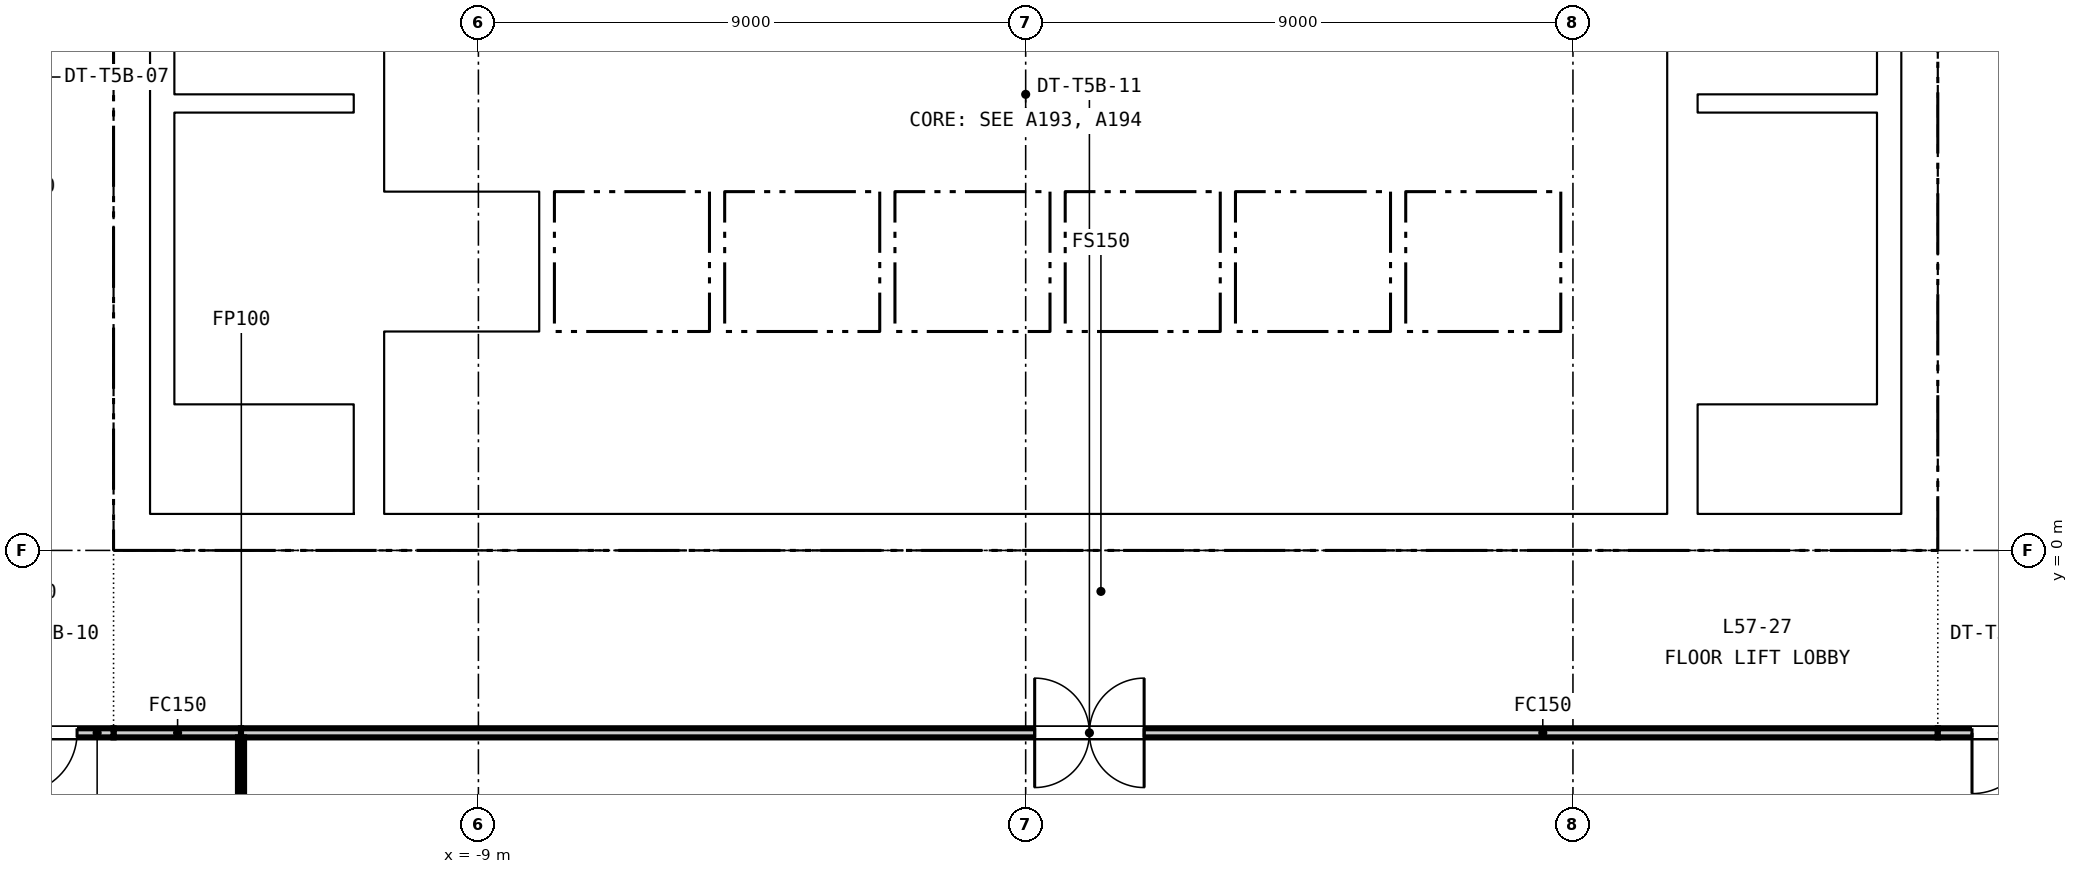
"""IFC4 building model, lengths in metres.
Left out: names, types, materials, properties, quantities, classifications, styles, units other than length and angle.
Written with IfcOpenShell. Run it as: python <this file> out.ifc"""

import sys

from ifc_helpers import new_model, si_unit, direction, frame, frame_2d, origin, place, context, subcontext, project, spatial, rectangle, extrude, element, fill, save


model = new_model("IFC4")
c1 = context("Model", 3, precision=1e-05, world=origin(), true_north=direction((0.0, 1.0)))
c2 = subcontext(c1, "Body", "Model", "MODEL_VIEW")
j1 = project(units=[si_unit("LENGTHUNIT", "METRE"), si_unit("PLANEANGLEUNIT", "RADIAN")], contexts=[c1])
p1 = place(None, origin())
s1 = spatial("IfcSite", under=j1, at=p1, CompositionType="ELEMENT")
p2 = place(p1, origin())
s2 = spatial("IfcBuilding", under=s1, at=p2, CompositionType="ELEMENT")
p3 = place(p2, frame((0.0, 0.0, 227.25)))
s3 = spatial("IfcBuildingStorey", under=s2, at=p3, CompositionType="ELEMENT", Elevation=227.25)
p4 = place(p3, frame((-15.0, 0.3, -0.15), z_axis=(0.0, 0.0, 1.0), x_axis=(1.0, 0.0, 0.0)))
e1 = element("IfcWall", 1, at=p4, inside=s3, PredefinedType="SOLIDWALL", context=c2, shape_type="SweptSolid", body=[
    extrude(rectangle(XDim=30.0, YDim=0.6, at=frame_2d((15.0, 0.0))), origin(), (0.0, 0.0, 1.0), 3.65),
])
p5 = place(p4, frame((5.8, 0.0, 0.15)))
e2 = element("IfcOpeningElement", 2, at=p5, cuts=e1, PredefinedType="OPENING", context=c2, shape_type="SweptSolid", body=[
    extrude(rectangle(XDim=2.4, YDim=2.4, at=frame_2d((1.2, 1.2))), frame((0.0, 0.31, 0.0), z_axis=(0.0, -1.0, 0.0), x_axis=(1.0, 0.0, 0.0)), (0.0, 0.0, 1.0), 0.62),
])
p6 = place(p4, frame((13.8, 0.0, 0.15)))
e3 = element("IfcOpeningElement", 3, at=p6, cuts=e1, PredefinedType="OPENING", context=c2, shape_type="SweptSolid", body=[
    extrude(rectangle(XDim=2.4, YDim=2.4, at=frame_2d((1.2, 1.2))), frame((0.0, 0.31, 0.0), z_axis=(0.0, -1.0, 0.0), x_axis=(1.0, 0.0, 0.0)), (0.0, 0.0, 1.0), 0.62),
])
p7 = place(p4, frame((21.8, 0.0, 0.15)))
e4 = element("IfcOpeningElement", 4, at=p7, cuts=e1, PredefinedType="OPENING", context=c2, shape_type="SweptSolid", body=[
    extrude(rectangle(XDim=2.4, YDim=2.4, at=frame_2d((1.2, 1.2))), frame((0.0, 0.31, 0.0), z_axis=(0.0, -1.0, 0.0), x_axis=(1.0, 0.0, 0.0)), (0.0, 0.0, 1.0), 0.62),
])
p8 = place(p4, frame((1.5, 0.0, 0.15)))
e5 = element("IfcOpeningElement", 5, at=p8, cuts=e1, PredefinedType="OPENING", context=c2, shape_type="SweptSolid", body=[
    extrude(rectangle(XDim=1.2, YDim=2.1, at=frame_2d((0.6, 1.05))), frame((0.0, 0.31, 0.0), z_axis=(0.0, -1.0, 0.0), x_axis=(1.0, 0.0, 0.0)), (0.0, 0.0, 1.0), 0.62),
])
p9 = place(p4, frame((27.3, 0.0, 0.15)))
e6 = element("IfcOpeningElement", 6, at=p9, cuts=e1, PredefinedType="OPENING", context=c2, shape_type="SweptSolid", body=[
    extrude(rectangle(XDim=1.2, YDim=2.1, at=frame_2d((0.6, 1.05))), frame((0.0, 0.31, 0.0), z_axis=(0.0, -1.0, 0.0), x_axis=(1.0, 0.0, 0.0)), (0.0, 0.0, 1.0), 0.62),
])
for number, where, z_axis, x_axis in (
    (7, (-14.7, 0.6, -0.15), (0.0, 0.0, 1.0), (0.0, 1.0, 0.0)),
    (8, (14.7, 0.6, -0.15), (0.0, 0.0, 1.0), (0.0, 1.0, 0.0)),
):
    element("IfcWall", number, at=place(p3, frame(where, z_axis=z_axis, x_axis=x_axis)), inside=s3, PredefinedType="SOLIDWALL", context=c2, shape_type="SweptSolid", body=[
        extrude(rectangle(XDim=13.8, YDim=0.6, at=frame_2d((6.9, 0.0))), origin(), (0.0, 0.0, 1.0), 3.65),
    ])
for number, where, z_axis, x_axis in (
    (9, (-10.8, 0.6, -0.15), (0.0, 0.0, 1.0), (0.0, 1.0, 0.0)),
    (10, (10.8, 0.6, -0.15), (0.0, 0.0, 1.0), (0.0, 1.0, 0.0)),
):
    element("IfcWall", number, at=place(p3, frame(where, z_axis=z_axis, x_axis=x_axis)), inside=s3, PredefinedType="SOLIDWALL", context=c2, shape_type="SweptSolid", body=[
        extrude(rectangle(XDim=13.8, YDim=0.5, at=frame_2d((6.9, 0.0))), origin(), (0.0, 0.0, 1.0), 3.65),
    ])
p10 = place(p3, frame((-10.55, 3.5, 0.0), z_axis=(0.0, 0.0, 1.0), x_axis=(1.0, 0.0, 0.0)))
e11 = element("IfcWall", 11, at=p10, inside=s3, PredefinedType="PARTITIONING", context=c2, shape_type="SweptSolid", body=[
    extrude(rectangle(XDim=21.1, YDim=0.2, at=frame_2d((10.55, 0.0))), origin(), (0.0, 0.0, 1.0), 3.5),
])
p11 = place(p10, frame((0.675, 0.0, 0.0)))
e12 = element("IfcOpeningElement", 12, at=p11, cuts=e11, PredefinedType="OPENING", context=c2, shape_type="SweptSolid", body=[
    extrude(rectangle(XDim=1.2, YDim=2.1, at=frame_2d((0.6, 1.05))), frame((0.0, 0.11, 0.0), z_axis=(0.0, -1.0, 0.0), x_axis=(1.0, 0.0, 0.0)), (0.0, 0.0, 1.0), 0.22),
])
p12 = place(p10, frame((3.475, 0.0, 0.0)))
e13 = element("IfcOpeningElement", 13, at=p12, cuts=e11, PredefinedType="OPENING", context=c2, shape_type="SweptSolid", body=[
    extrude(rectangle(XDim=1.2, YDim=2.1, at=frame_2d((0.6, 1.05))), frame((0.0, 0.11, 0.0), z_axis=(0.0, -1.0, 0.0), x_axis=(1.0, 0.0, 0.0)), (0.0, 0.0, 1.0), 0.22),
])
p13 = place(p10, frame((6.275, 0.0, 0.0)))
e14 = element("IfcOpeningElement", 14, at=p13, cuts=e11, PredefinedType="OPENING", context=c2, shape_type="SweptSolid", body=[
    extrude(rectangle(XDim=1.2, YDim=2.1, at=frame_2d((0.6, 1.05))), frame((0.0, 0.11, 0.0), z_axis=(0.0, -1.0, 0.0), x_axis=(1.0, 0.0, 0.0)), (0.0, 0.0, 1.0), 0.22),
])
p14 = place(p10, frame((9.075, 0.0, 0.0)))
e15 = element("IfcOpeningElement", 15, at=p14, cuts=e11, PredefinedType="OPENING", context=c2, shape_type="SweptSolid", body=[
    extrude(rectangle(XDim=1.2, YDim=2.1, at=frame_2d((0.6, 1.05))), frame((0.0, 0.11, 0.0), z_axis=(0.0, -1.0, 0.0), x_axis=(1.0, 0.0, 0.0)), (0.0, 0.0, 1.0), 0.22),
])
p15 = place(p10, frame((11.875, 0.0, 0.0)))
e16 = element("IfcOpeningElement", 16, at=p15, cuts=e11, PredefinedType="OPENING", context=c2, shape_type="SweptSolid", body=[
    extrude(rectangle(XDim=1.2, YDim=2.1, at=frame_2d((0.6, 1.05))), frame((0.0, 0.11, 0.0), z_axis=(0.0, -1.0, 0.0), x_axis=(1.0, 0.0, 0.0)), (0.0, 0.0, 1.0), 0.22),
])
p16 = place(p10, frame((14.675, 0.0, 0.0)))
e17 = element("IfcOpeningElement", 17, at=p16, cuts=e11, PredefinedType="OPENING", context=c2, shape_type="SweptSolid", body=[
    extrude(rectangle(XDim=1.2, YDim=2.1, at=frame_2d((0.6, 1.05))), frame((0.0, 0.11, 0.0), z_axis=(0.0, -1.0, 0.0), x_axis=(1.0, 0.0, 0.0)), (0.0, 0.0, 1.0), 0.22),
])
p17 = place(p10, frame((17.475, 0.0, 0.0)))
e18 = element("IfcOpeningElement", 18, at=p17, cuts=e11, PredefinedType="OPENING", context=c2, shape_type="SweptSolid", body=[
    extrude(rectangle(XDim=1.2, YDim=2.1, at=frame_2d((0.6, 1.05))), frame((0.0, 0.11, 0.0), z_axis=(0.0, -1.0, 0.0), x_axis=(1.0, 0.0, 0.0)), (0.0, 0.0, 1.0), 0.22),
])
p18 = place(p10, frame((19.9, 0.0, 0.0)))
e19 = element("IfcOpeningElement", 19, at=p18, cuts=e11, PredefinedType="OPENING", context=c2, shape_type="SweptSolid", body=[
    extrude(rectangle(XDim=0.9, YDim=2.1, at=frame_2d((0.45, 1.05))), frame((0.0, 0.11, 0.0), z_axis=(0.0, -1.0, 0.0), x_axis=(1.0, 0.0, 0.0)), (0.0, 0.0, 1.0), 0.22),
])
p19 = place(p3, frame((-10.55, 6.025, 0.0), z_axis=(0.0, 0.0, 1.0), x_axis=(1.0, 0.0, 0.0)))
e20 = element("IfcWall", 20, at=p19, inside=s3, PredefinedType="PARTITIONING", context=c2, shape_type="SweptSolid", body=[
    extrude(rectangle(XDim=21.1, YDim=0.25, at=frame_2d((10.55, 0.0))), origin(), (0.0, 0.0, 1.0), 3.5),
])
p20 = place(p3, frame((-4.125, 6.15, 0.0), z_axis=(0.0, 0.0, 1.0), x_axis=(0.0, 1.0, 0.0)))
e21 = element("IfcWall", 21, at=p20, inside=s3, PredefinedType="PARTITIONING", context=c2, shape_type="SweptSolid", body=[
    extrude(rectangle(XDim=4.95, YDim=0.25, at=frame_2d((2.475, 0.0))), origin(), (0.0, 0.0, 1.0), 3.5),
])
p21 = place(p20, frame((3.125, 0.0, 0.0)))
e22 = element("IfcOpeningElement", 22, at=p21, cuts=e21, PredefinedType="OPENING", context=c2, shape_type="SweptSolid", body=[
    extrude(rectangle(XDim=1.2, YDim=2.1, at=frame_2d((0.6, 1.05))), frame((0.0, 0.135, 0.0), z_axis=(0.0, -1.0, 0.0), x_axis=(1.0, 0.0, 0.0)), (0.0, 0.0, 1.0), 0.27),
])
for number, where, z_axis, x_axis in (
    (23, (-7.875, 3.6, 0.0), (0.0, 0.0, 1.0), (0.0, 1.0, 0.0)),
    (24, (-5.075, 3.6, 0.0), (0.0, 0.0, 1.0), (0.0, 1.0, 0.0)),
    (25, (-2.275, 3.6, 0.0), (0.0, 0.0, 1.0), (0.0, 1.0, 0.0)),
    (26, (0.525, 3.6, 0.0), (0.0, 0.0, 1.0), (0.0, 1.0, 0.0)),
    (27, (3.325, 3.6, 0.0), (0.0, 0.0, 1.0), (0.0, 1.0, 0.0)),
    (28, (6.125, 3.6, 0.0), (0.0, 0.0, 1.0), (0.0, 1.0, 0.0)),
    (29, (8.925, 3.6, 0.0), (0.0, 0.0, 1.0), (0.0, 1.0, 0.0)),
):
    element("IfcWall", number, at=place(p3, frame(where, z_axis=z_axis, x_axis=x_axis)), inside=s3, PredefinedType="PARTITIONING", context=c2, shape_type="SweptSolid", body=[
        extrude(rectangle(XDim=2.3, YDim=0.25, at=frame_2d((1.15, 0.0))), origin(), (0.0, 0.0, 1.0), 3.5),
    ])
for number, where, z_axis, x_axis in (
    (30, (1.7, 6.15, 0.0), (0.0, 0.0, 1.0), (0.0, 1.0, 0.0)),
    (31, (4.6, 6.15, 0.0), (0.0, 0.0, 1.0), (0.0, 1.0, 0.0)),
):
    element("IfcWall", number, at=place(p3, frame(where, z_axis=z_axis, x_axis=x_axis)), inside=s3, PredefinedType="PARTITIONING", context=c2, shape_type="SweptSolid", body=[
        extrude(rectangle(XDim=2.3, YDim=0.15, at=frame_2d((1.15, 0.0))), origin(), (0.0, 0.0, 1.0), 3.5),
    ])
p22 = place(p3, frame((8.925, 6.15, 0.0), z_axis=(0.0, 0.0, 1.0), x_axis=(0.0, 1.0, 0.0)))
e32 = element("IfcWall", 32, at=p22, inside=s3, PredefinedType="PARTITIONING", context=c2, shape_type="SweptSolid", body=[
    extrude(rectangle(XDim=2.3, YDim=0.25, at=frame_2d((1.15, 0.0))), origin(), (0.0, 0.0, 1.0), 3.5),
])
p23 = place(p3, frame((-14.0, 7.35, 0.0), z_axis=(0.0, 0.0, 1.0), x_axis=(1.0, 0.0, 0.0)))
e33 = element("IfcWall", 33, at=p23, inside=s3, PredefinedType="SOLIDWALL", context=c2, shape_type="SweptSolid", body=[
    extrude(rectangle(XDim=2.95, YDim=0.3, at=frame_2d((1.475, 0.0))), origin(), (0.0, 0.0, 1.0), 3.5),
])
p24 = place(p3, frame((-14.2, 0.6, 0.0), z_axis=(0.0, 0.0, 1.0), x_axis=(0.0, 1.0, 0.0)))
e34 = element("IfcWall", 34, at=p24, inside=s3, PredefinedType="SOLIDWALL", context=c2, shape_type="SweptSolid", body=[
    extrude(rectangle(XDim=13.8, YDim=0.4, at=frame_2d((6.9, 0.0))), origin(), (0.0, 0.0, 1.0), 3.5),
])
p25 = place(p3, frame((11.05, 7.35, 0.0), z_axis=(0.0, 0.0, 1.0), x_axis=(1.0, 0.0, 0.0)))
e35 = element("IfcWall", 35, at=p25, inside=s3, PredefinedType="SOLIDWALL", context=c2, shape_type="SweptSolid", body=[
    extrude(rectangle(XDim=2.95, YDim=0.3, at=frame_2d((1.475, 0.0))), origin(), (0.0, 0.0, 1.0), 3.5),
])
p26 = place(p3, frame((14.2, 0.6, 0.0), z_axis=(0.0, 0.0, 1.0), x_axis=(0.0, 1.0, 0.0)))
e36 = element("IfcWall", 36, at=p26, inside=s3, PredefinedType="SOLIDWALL", context=c2, shape_type="SweptSolid", body=[
    extrude(rectangle(XDim=13.8, YDim=0.4, at=frame_2d((6.9, 0.0))), origin(), (0.0, 0.0, 1.0), 3.5),
])
p27 = place(p3, frame((-12.904, -3.0, 0.0), z_axis=(0.0, 0.0, 1.0), x_axis=(-1.0, 0.0, 0.0)))
e37 = element("IfcWall", 37, at=p27, inside=s3, PredefinedType="PARTITIONING", context=c2, shape_type="SweptSolid", body=[
    extrude(rectangle(XDim=2.096, YDim=0.15, at=frame_2d((1.048, 0.0))), origin(), (0.0, 0.0, 1.0), 2.751),
])
p28 = place(p3, frame((15.0, -3.0, 0.0), z_axis=(0.0, 0.0, 1.0), x_axis=(-1.0, 0.0, 0.0)))
e38 = element("IfcWall", 38, at=p28, inside=s3, PredefinedType="PARTITIONING", context=c2, shape_type="SweptSolid", body=[
    extrude(rectangle(XDim=27.904, YDim=0.15, at=frame_2d((13.952, 0.0))), origin(), (0.0, 0.0, 1.0), 2.751),
])
p29 = place(p28, frame((13.052, 0.0, 0.0)))
e39 = element("IfcOpeningElement", 39, at=p29, cuts=e38, PredefinedType="OPENING", context=c2, shape_type="SweptSolid", body=[
    extrude(rectangle(XDim=1.8, YDim=2.1, at=frame_2d((0.9, 1.05))), frame((0.0, 0.085, 0.0), z_axis=(0.0, -1.0, 0.0), x_axis=(1.0, 0.0, 0.0)), (0.0, 0.0, 1.0), 0.17),
])
p30 = place(p3, frame((-15.0, -3.0, 0.0), z_axis=(0.0, 0.0, 1.0), x_axis=(-1.0, 0.0, 0.0)))
e40 = element("IfcWall", 40, at=p30, inside=s3, PredefinedType="PARTITIONING", context=c2, shape_type="SweptSolid", body=[
    extrude(rectangle(XDim=2.2, YDim=0.15, at=frame_2d((1.1, 0.0))), origin(), (0.0, 0.0, 1.0), 2.751),
])
p31 = place(p30, frame((0.6, 0.0, 0.0)))
e41 = element("IfcOpeningElement", 41, at=p31, cuts=e40, PredefinedType="OPENING", context=c2, shape_type="SweptSolid", body=[
    extrude(rectangle(XDim=1.0, YDim=2.1, at=frame_2d((0.5, 1.05))), frame((0.0, 0.085, 0.0), z_axis=(0.0, -1.0, 0.0), x_axis=(1.0, 0.0, 0.0)), (0.0, 0.0, 1.0), 0.17),
])
p32 = place(p3, frame((17.125, -3.0, 0.0), z_axis=(0.0, 0.0, 1.0), x_axis=(-1.0, 0.0, 0.0)))
e42 = element("IfcWall", 42, at=p32, inside=s3, PredefinedType="PARTITIONING", context=c2, shape_type="SweptSolid", body=[
    extrude(rectangle(XDim=2.125, YDim=0.15, at=frame_2d((1.062, 0.0))), origin(), (0.0, 0.0, 1.0), 2.751),
])
p33 = place(p32, frame((0.562, 0.0, 0.0)))
e43 = element("IfcOpeningElement", 43, at=p33, cuts=e42, PredefinedType="OPENING", context=c2, shape_type="SweptSolid", body=[
    extrude(rectangle(XDim=1.0, YDim=2.1, at=frame_2d((0.5, 1.05))), frame((0.0, 0.085, 0.0), z_axis=(0.0, -1.0, 0.0), x_axis=(1.0, 0.0, 0.0)), (0.0, 0.0, 1.0), 0.17),
])
p34 = place(p3, frame((-12.904, -10.596, 0.0), z_axis=(0.0, 0.0, 1.0), x_axis=(0.0, 1.0, 0.0)))
e44 = element("IfcWall", 44, at=p34, inside=s3, PredefinedType="PARTITIONING", context=c2, shape_type="SweptSolid", body=[
    extrude(rectangle(XDim=7.521, YDim=0.1, at=frame_2d((3.76, 0.0))), origin(), (0.0, 0.0, 1.0), 2.751),
])
p35 = place(p11, origin())
e45 = element("IfcDoor", 45, at=p35, inside=s3, OperationType="DOUBLE_DOOR_SLIDING", PredefinedType="DOOR", context=c2, shape_type="SweptSolid", body=[
    extrude(rectangle(XDim=1.2, YDim=2.1, at=frame_2d((0.6, 1.05))), frame((0.0, 0.025, 0.0), z_axis=(0.0, -1.0, 0.0), x_axis=(1.0, 0.0, 0.0)), (0.0, 0.0, 1.0), 0.05),
])
fill(e12, e45)
p36 = place(p12, origin())
e46 = element("IfcDoor", 46, at=p36, inside=s3, OperationType="DOUBLE_DOOR_SLIDING", PredefinedType="DOOR", context=c2, shape_type="SweptSolid", body=[
    extrude(rectangle(XDim=1.2, YDim=2.1, at=frame_2d((0.6, 1.05))), frame((0.0, 0.025, 0.0), z_axis=(0.0, -1.0, 0.0), x_axis=(1.0, 0.0, 0.0)), (0.0, 0.0, 1.0), 0.05),
])
fill(e13, e46)
p37 = place(p13, origin())
e47 = element("IfcDoor", 47, at=p37, inside=s3, OperationType="DOUBLE_DOOR_SLIDING", PredefinedType="DOOR", context=c2, shape_type="SweptSolid", body=[
    extrude(rectangle(XDim=1.2, YDim=2.1, at=frame_2d((0.6, 1.05))), frame((0.0, 0.025, 0.0), z_axis=(0.0, -1.0, 0.0), x_axis=(1.0, 0.0, 0.0)), (0.0, 0.0, 1.0), 0.05),
])
fill(e14, e47)
p38 = place(p14, origin())
e48 = element("IfcDoor", 48, at=p38, inside=s3, OperationType="DOUBLE_DOOR_SLIDING", PredefinedType="DOOR", context=c2, shape_type="SweptSolid", body=[
    extrude(rectangle(XDim=1.2, YDim=2.1, at=frame_2d((0.6, 1.05))), frame((0.0, 0.025, 0.0), z_axis=(0.0, -1.0, 0.0), x_axis=(1.0, 0.0, 0.0)), (0.0, 0.0, 1.0), 0.05),
])
fill(e15, e48)
p39 = place(p15, origin())
e49 = element("IfcDoor", 49, at=p39, inside=s3, OperationType="DOUBLE_DOOR_SLIDING", PredefinedType="DOOR", context=c2, shape_type="SweptSolid", body=[
    extrude(rectangle(XDim=1.2, YDim=2.1, at=frame_2d((0.6, 1.05))), frame((0.0, 0.025, 0.0), z_axis=(0.0, -1.0, 0.0), x_axis=(1.0, 0.0, 0.0)), (0.0, 0.0, 1.0), 0.05),
])
fill(e16, e49)
p40 = place(p16, origin())
e50 = element("IfcDoor", 50, at=p40, inside=s3, OperationType="DOUBLE_DOOR_SLIDING", PredefinedType="DOOR", context=c2, shape_type="SweptSolid", body=[
    extrude(rectangle(XDim=1.2, YDim=2.1, at=frame_2d((0.6, 1.05))), frame((0.0, 0.025, 0.0), z_axis=(0.0, -1.0, 0.0), x_axis=(1.0, 0.0, 0.0)), (0.0, 0.0, 1.0), 0.05),
])
fill(e17, e50)
p41 = place(p17, origin())
e51 = element("IfcDoor", 51, at=p41, inside=s3, OperationType="DOUBLE_DOOR_SLIDING", PredefinedType="DOOR", context=c2, shape_type="SweptSolid", body=[
    extrude(rectangle(XDim=1.2, YDim=2.1, at=frame_2d((0.6, 1.05))), frame((0.0, 0.025, 0.0), z_axis=(0.0, -1.0, 0.0), x_axis=(1.0, 0.0, 0.0)), (0.0, 0.0, 1.0), 0.05),
])
fill(e18, e51)
p42 = place(p18, origin())
e52 = element("IfcDoor", 52, at=p42, inside=s3, OperationType="SINGLE_SWING_RIGHT", PredefinedType="DOOR", context=c2, shape_type="SweptSolid", body=[
    extrude(rectangle(XDim=0.9, YDim=2.1, at=frame_2d((0.45, 1.05))), frame((0.0, 0.025, 0.0), z_axis=(0.0, -1.0, 0.0), x_axis=(1.0, 0.0, 0.0)), (0.0, 0.0, 1.0), 0.05),
])
fill(e19, e52)
p43 = place(p5, origin())
e53 = element("IfcDoor", 53, at=p43, inside=s3, OperationType="DOUBLE_DOOR_DOUBLE_SWING", PredefinedType="DOOR", context=c2, shape_type="SweptSolid", body=[
    extrude(rectangle(XDim=2.4, YDim=2.4, at=frame_2d((1.2, 1.2))), frame((0.0, 0.025, 0.0), z_axis=(0.0, -1.0, 0.0), x_axis=(1.0, 0.0, 0.0)), (0.0, 0.0, 1.0), 0.05),
])
fill(e2, e53)
p44 = place(p6, origin())
e54 = element("IfcDoor", 54, at=p44, inside=s3, OperationType="DOUBLE_DOOR_DOUBLE_SWING", PredefinedType="DOOR", context=c2, shape_type="SweptSolid", body=[
    extrude(rectangle(XDim=2.4, YDim=2.4, at=frame_2d((1.2, 1.2))), frame((0.0, 0.025, 0.0), z_axis=(0.0, -1.0, 0.0), x_axis=(1.0, 0.0, 0.0)), (0.0, 0.0, 1.0), 0.05),
])
fill(e3, e54)
p45 = place(p7, origin())
e55 = element("IfcDoor", 55, at=p45, inside=s3, OperationType="DOUBLE_DOOR_DOUBLE_SWING", PredefinedType="DOOR", context=c2, shape_type="SweptSolid", body=[
    extrude(rectangle(XDim=2.4, YDim=2.4, at=frame_2d((1.2, 1.2))), frame((0.0, 0.025, 0.0), z_axis=(0.0, -1.0, 0.0), x_axis=(1.0, 0.0, 0.0)), (0.0, 0.0, 1.0), 0.05),
])
fill(e4, e55)
p46 = place(p8, origin())
e56 = element("IfcDoor", 56, at=p46, inside=s3, OperationType="SINGLE_SWING_LEFT", PredefinedType="DOOR", context=c2, shape_type="SweptSolid", body=[
    extrude(rectangle(XDim=1.2, YDim=2.1, at=frame_2d((0.6, 1.05))), frame((0.0, 0.025, 0.0), z_axis=(0.0, -1.0, 0.0), x_axis=(1.0, 0.0, 0.0)), (0.0, 0.0, 1.0), 0.05),
])
fill(e5, e56)
p47 = place(p9, origin())
e57 = element("IfcDoor", 57, at=p47, inside=s3, OperationType="SINGLE_SWING_RIGHT", PredefinedType="DOOR", context=c2, shape_type="SweptSolid", body=[
    extrude(rectangle(XDim=1.2, YDim=2.1, at=frame_2d((0.6, 1.05))), frame((0.0, 0.025, 0.0), z_axis=(0.0, -1.0, 0.0), x_axis=(1.0, 0.0, 0.0)), (0.0, 0.0, 1.0), 0.05),
])
fill(e6, e57)
p48 = place(p31, origin())
e58 = element("IfcDoor", 58, at=p48, inside=s3, OperationType="SINGLE_SWING_RIGHT", PredefinedType="DOOR", context=c2, shape_type="SweptSolid", body=[
    extrude(rectangle(XDim=1.0, YDim=2.1, at=frame_2d((0.5, 1.05))), frame((0.0, 0.025, 0.0), z_axis=(0.0, -1.0, 0.0), x_axis=(1.0, 0.0, 0.0)), (0.0, 0.0, 1.0), 0.05),
])
fill(e41, e58)
p49 = place(p29, origin())
e59 = element("IfcDoor", 59, at=p49, inside=s3, OperationType="DOUBLE_DOOR_DOUBLE_SWING", PredefinedType="DOOR", context=c2, shape_type="SweptSolid", body=[
    extrude(rectangle(XDim=1.8, YDim=2.1, at=frame_2d((0.9, 1.05))), frame((0.0, 0.025, 0.0), z_axis=(0.0, -1.0, 0.0), x_axis=(1.0, 0.0, 0.0)), (0.0, 0.0, 1.0), 0.05),
])
fill(e39, e59)
p50 = place(p33, origin())
e60 = element("IfcDoor", 60, at=p50, inside=s3, OperationType="SINGLE_SWING_RIGHT", PredefinedType="DOOR", context=c2, shape_type="SweptSolid", body=[
    extrude(rectangle(XDim=1.0, YDim=2.1, at=frame_2d((0.5, 1.05))), frame((0.0, 0.025, 0.0), z_axis=(0.0, -1.0, 0.0), x_axis=(1.0, 0.0, 0.0)), (0.0, 0.0, 1.0), 0.05),
])
fill(e43, e60)
save(model, sys.argv[1])
